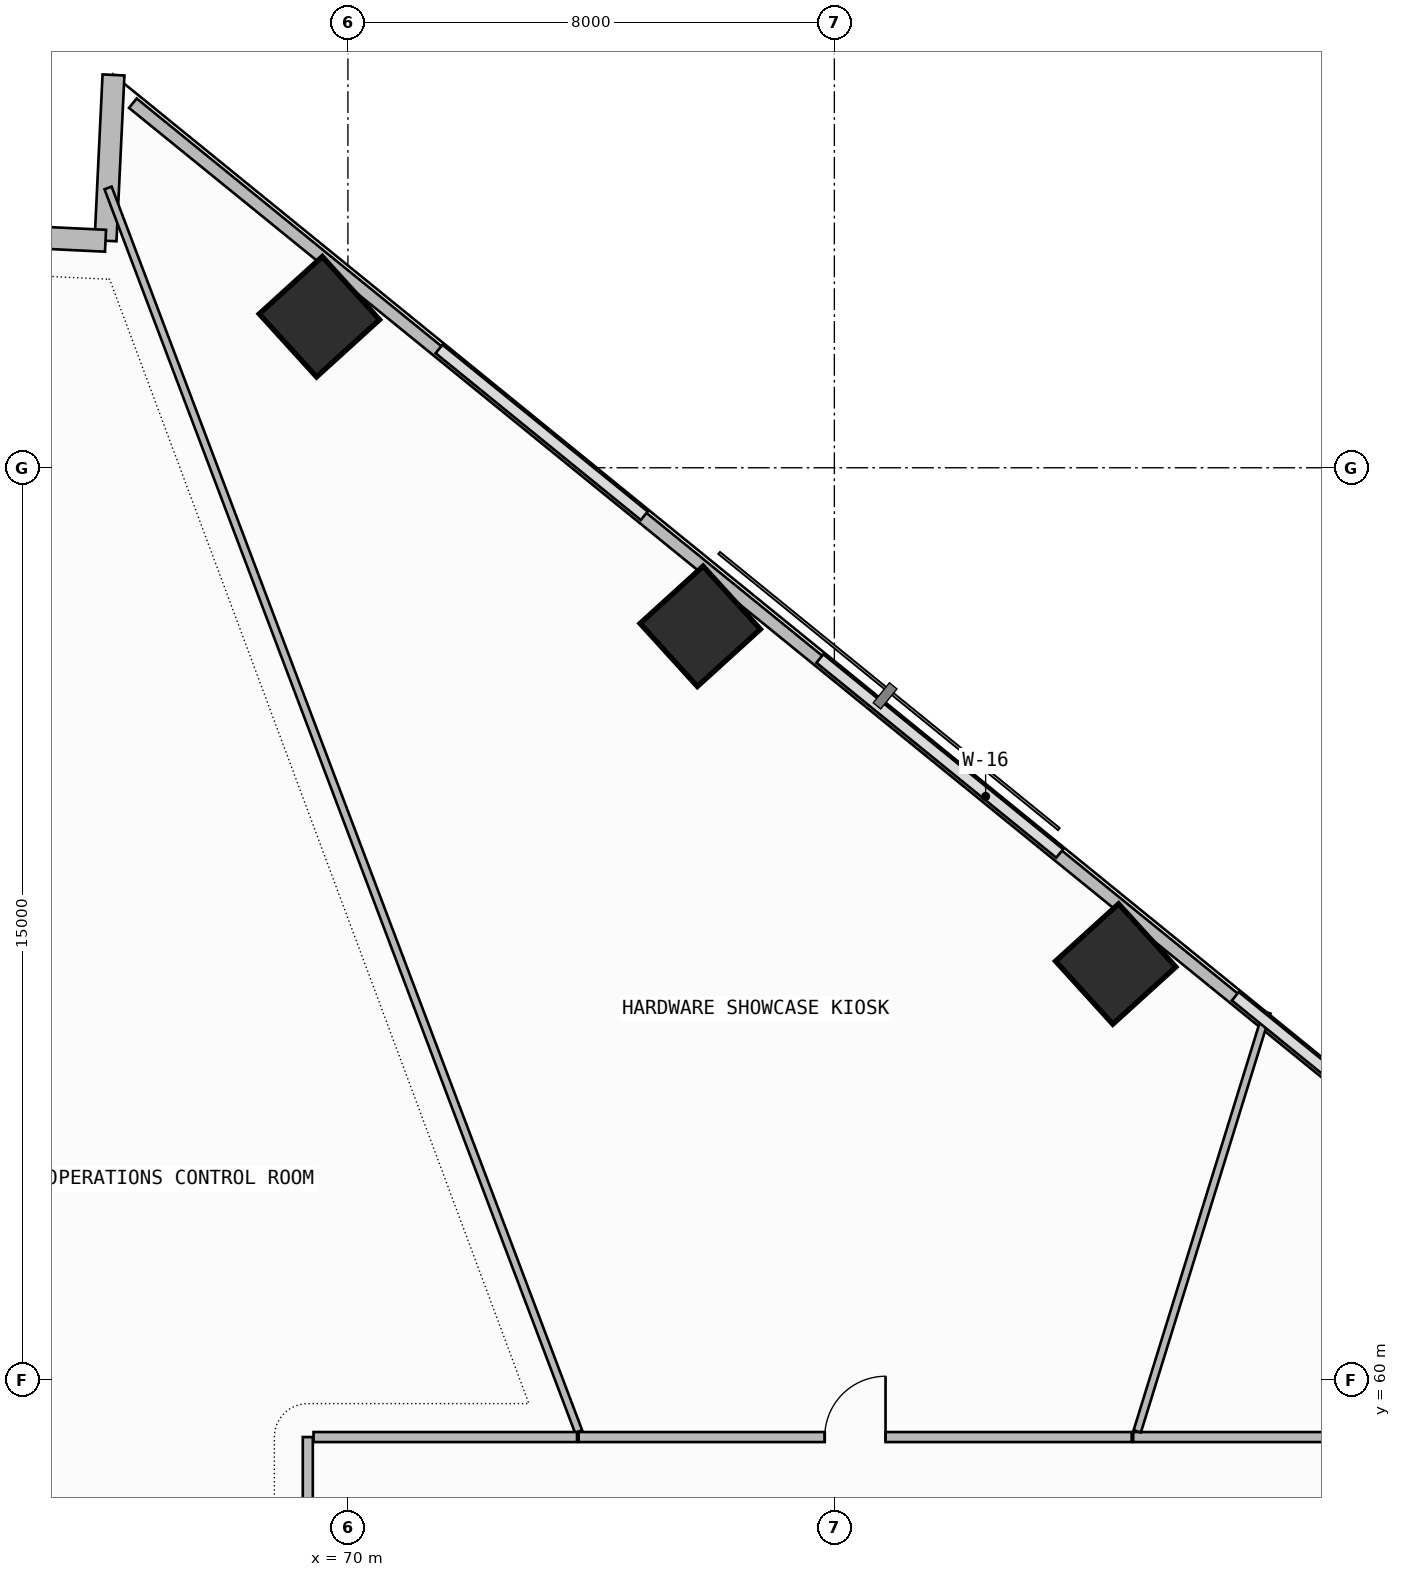
"""IFC4 building model, lengths in metres.
Left out: names, types, materials, properties, quantities, classifications, styles, units other than length and angle.
Written with IfcOpenShell. Run it as: python <this file> out.ifc"""

import sys

from ifc_helpers import new_model, si_unit, direction, frame, frame_2d, origin, origin_2d, place, context, subcontext, project, spatial, rectangle, extrude, element, fill, save


model = new_model("IFC4")
c1 = context("Model", 3, precision=1e-05, world=origin(), true_north=direction((0.0, 1.0)))
c2 = subcontext(c1, "Body", "Model", "MODEL_VIEW")
j1 = project(units=[si_unit("LENGTHUNIT", "METRE"), si_unit("PLANEANGLEUNIT", "RADIAN")], contexts=[c1])
p1 = place(None, origin())
s1 = spatial("IfcSite", under=j1, at=p1, CompositionType="ELEMENT")
p2 = place(p1, origin())
s2 = spatial("IfcBuilding", under=s1, at=p2, CompositionType="ELEMENT")
p3 = place(p2, frame((0.0, 0.0, 44.7)))
s3 = spatial("IfcBuildingStorey", under=s2, at=p3, CompositionType="ELEMENT", Elevation=44.7)
for number, where, z_axis, x_axis in (
    (1, (82.627, 66.839, 0.0), (0.0, 0.0, 1.0), (0.74, 0.672, 0.0)),
    (2, (75.794, 72.392, 0.0), (0.0, 0.0, 1.0), (0.74, 0.672, 0.0)),
    (3, (69.531, 77.483, 0.0), (0.0, 0.0, 1.0), (0.74, 0.672, 0.0)),
):
    element("IfcColumn", number, at=place(p3, frame(where, z_axis=z_axis, x_axis=x_axis)), inside=s3, PredefinedType="COLUMN", context=c2, shape_type="SweptSolid", body=[
        extrude(rectangle(XDim=1.4, YDim=1.4, at=origin_2d()), origin(), (0.0, 0.0, 1.0), 3.6),
    ])
for number, where, z_axis, x_axis in (
    (4, (66.144, 81.46, 0.0), (0.0, 0.0, 1.0), (-0.048, -0.999, 0.0)),
    (5, (66.013, 78.733, 0.0), (0.0, 0.0, 1.0), (-0.999, 0.048, 0.0)),
):
    element("IfcWall", number, at=place(p3, frame(where, z_axis=z_axis, x_axis=x_axis)), inside=s3, PredefinedType="SOLIDWALL", context=c2, shape_type="SweptSolid", body=[
        extrude(rectangle(XDim=2.73, YDim=0.36, at=frame_2d((1.365, 0.0))), origin(), (0.0, 0.0, 1.0), 3.34),
    ])
p4 = place(p3, frame((94.513, 58.196, 0.0), z_axis=(0.0, 0.0, 1.0), x_axis=(-0.776001602097, 0.630730935933, 0.0)))
e6 = element("IfcWall", 6, at=p4, inside=s3, PredefinedType="PARAPET", context=c2, shape_type="SweptSolid", body=[
    extrude(rectangle(XDim=36.148, YDim=0.2, at=frame_2d((18.074, 0.0))), origin(), (0.0, 0.0, 1.0), 1.15),
])
p5 = place(p3, frame((88.193, 59.06, 0.0), z_axis=(0.0, 0.0, 1.0), x_axis=(-1.0, 0.0, 0.0)))
e7 = element("IfcWall", 7, at=p5, inside=s3, PredefinedType="PARTITIONING", context=c2, shape_type="SweptSolid", body=[
    extrude(rectangle(XDim=5.278, YDim=0.165, at=frame_2d((2.639, 0.0))), origin(), (0.0, 0.0, 1.0), 2.725),
])
p6 = place(p3, frame((82.982, 59.155, 0.0), z_axis=(0.0, 0.0, 1.0), x_axis=(0.295491705725, 0.955345305033, 0.0)))
e8 = element("IfcWall", 8, at=p6, inside=s3, PredefinedType="PARTITIONING", context=c2, shape_type="SweptSolid", body=[
    extrude(rectangle(XDim=7.21, YDim=0.125, at=frame_2d((3.605, 0.0))), origin(), (0.0, 0.0, 1.0), 2.725),
])
p7 = place(p3, frame((82.89, 59.06, 0.0), z_axis=(0.0, 0.0, 1.0), x_axis=(-1.0, 0.0, 0.0)))
e9 = element("IfcWall", 9, at=p7, inside=s3, PredefinedType="PARTITIONING", context=c2, shape_type="SweptSolid", body=[
    extrude(rectangle(XDim=9.096, YDim=0.165, at=frame_2d((4.548, 0.0))), origin(), (0.0, 0.0, 1.0), 3.34),
])
p8 = place(p7, frame((4.048, 0.0, 0.0)))
e10 = element("IfcOpeningElement", 10, at=p8, cuts=e9, PredefinedType="OPENING", context=c2, shape_type="SweptSolid", body=[
    extrude(rectangle(XDim=1.0, YDim=2.2, at=frame_2d((0.5, 1.1))), frame((0.0, 0.093, 0.0), z_axis=(0.0, -1.0, 0.0), x_axis=(1.0, 0.0, 0.0)), (0.0, 0.0, 1.0), 0.185),
])
p9 = place(p3, frame((73.794, 59.151, 0.0), z_axis=(0.0, 0.0, 1.0), x_axis=(-0.353905559912, 0.935281163428, 0.0)))
e11 = element("IfcWall", 11, at=p9, inside=s3, PredefinedType="PARTITIONING", context=c2, shape_type="SweptSolid", body=[
    extrude(rectangle(XDim=21.866, YDim=0.125, at=frame_2d((10.933, 0.0))), origin(), (0.0, 0.0, 1.0), 2.725),
])
p10 = place(p3, frame((69.34, 59.06, 0.0), z_axis=(0.0, 0.0, 1.0), x_axis=(0.0, -1.0, 0.0)))
e12 = element("IfcWall", 12, at=p10, inside=s3, PredefinedType="PARTITIONING", context=c2, shape_type="SweptSolid", body=[
    extrude(rectangle(XDim=11.176, YDim=0.165, at=frame_2d((5.588, 0.0))), origin(), (0.0, 0.0, 1.0), 2.725),
])
p11 = place(p10, frame((7.825, 0.0, 0.0)))
e13 = element("IfcOpeningElement", 13, at=p11, cuts=e12, PredefinedType="OPENING", context=c2, shape_type="SweptSolid", body=[
    extrude(rectangle(XDim=1.0, YDim=2.2, at=frame_2d((0.5, 1.1))), frame((0.0, 0.093, 0.0), z_axis=(0.0, -1.0, 0.0), x_axis=(1.0, 0.0, 0.0)), (0.0, 0.0, 1.0), 0.185),
])
p12 = place(p3, frame((73.768, 59.06, 0.0), z_axis=(0.0, 0.0, 1.0), x_axis=(-1.0, 0.0, 0.0)))
e14 = element("IfcWall", 14, at=p12, inside=s3, PredefinedType="PARTITIONING", context=c2, shape_type="SweptSolid", body=[
    extrude(rectangle(XDim=4.333, YDim=0.165, at=frame_2d((2.167, 0.0))), origin(), (0.0, 0.0, 1.0), 2.725),
])
p13 = place(p8, frame((1.0, 0.0, 0.0), z_axis=(0.0, 0.0, 1.0), x_axis=(-1.0, 0.0, 0.0)))
e15 = element("IfcDoor", 15, at=p13, inside=s3, OperationType="SINGLE_SWING_RIGHT", PredefinedType="DOOR", context=c2, shape_type="SweptSolid", body=[
    extrude(rectangle(XDim=1.0, YDim=2.2, at=frame_2d((0.5, 1.1))), frame((0.0, 0.025, 0.0), z_axis=(0.0, -1.0, 0.0), x_axis=(1.0, 0.0, 0.0)), (0.0, 0.0, 1.0), 0.05),
])
fill(e10, e15)
save(model, sys.argv[1])
